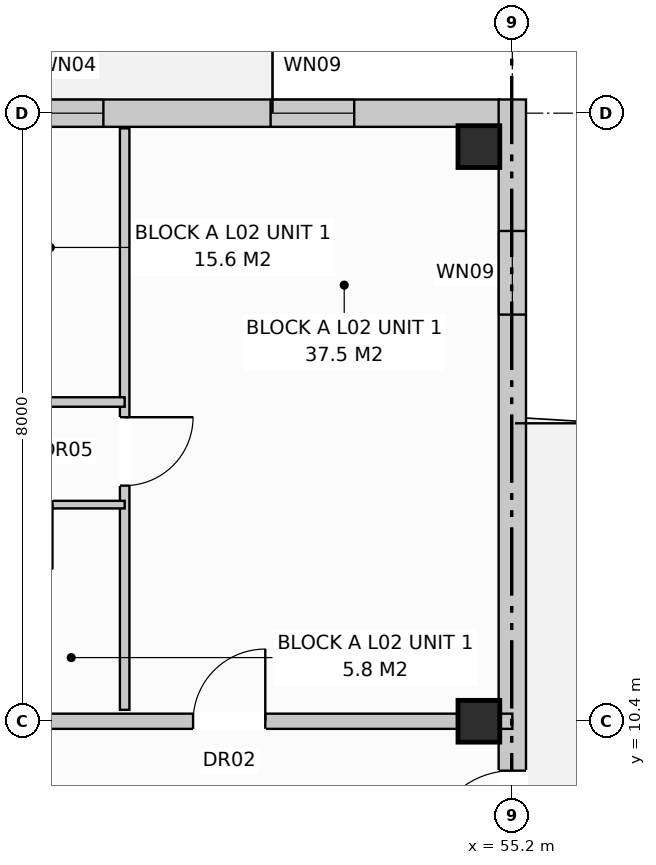
"""IFC4 building model, lengths in metres.
Left out: names, types, materials, properties, quantities, classifications, styles, units other than length and angle.
Written with IfcOpenShell. Run it as: python <this file> out.ifc"""

import sys

from ifc_helpers import new_model, si_unit, direction, frame, frame_2d, origin, origin_with_axes, origin_2d, place, context, subcontext, project, spatial, rectangle, extrude, element, fill, save


model = new_model("IFC4")
c1 = context("Model", 3, precision=1e-05, world=origin(), true_north=direction((0.0, 1.0)))
c2 = subcontext(c1, "Body", "Model", "MODEL_VIEW")
j1 = project(units=[si_unit("LENGTHUNIT", "METRE"), si_unit("PLANEANGLEUNIT", "RADIAN")], contexts=[c1])
p1 = place(None, origin())
s1 = spatial("IfcSite", under=j1, at=p1, CompositionType="ELEMENT")
p2 = place(p1, origin())
s2 = spatial("IfcBuilding", under=s1, at=p2, CompositionType="ELEMENT")
p3 = place(p2, frame((0.0, 0.0, 8.0)))
s3 = spatial("IfcBuildingStorey", under=s2, at=p3, CompositionType="ELEMENT", Elevation=8.0)
for number, where, z_axis, x_axis in (
    (1, (54.76, 10.4, 0.0), (0.0, 0.0, 1.0), (1.0, 0.0, 0.0)),
    (2, (54.76, 17.96, 0.0), (0.0, 0.0, 1.0), (1.0, 0.0, 0.0)),
):
    element("IfcColumn", number, at=place(p3, frame(where, z_axis=z_axis, x_axis=x_axis)), inside=s3, PredefinedType="COLUMN", context=c2, shape_type="SweptSolid", body=[
        extrude(rectangle(XDim=0.55, YDim=0.55, at=origin_2d()), origin(), (0.0, 0.0, 1.0), 3.2),
    ])
p4 = place(p3, frame((31.35, 18.4, 0.0), z_axis=(0.0, 0.0, 1.0), x_axis=(1.0, 0.0, 0.0)))
e3 = element("IfcWall", 3, at=p4, inside=s3, PredefinedType="STANDARD", context=c2, shape_type="SweptSolid", body=[
    extrude(rectangle(XDim=23.68, YDim=0.36, at=frame_2d((11.84, 0.0))), origin(), (0.0, 0.0, 1.0), 2.94),
])
p5 = place(p4, frame((15.27, 0.0, 0.0)))
e4 = element("IfcOpeningElement", 4, at=p5, cuts=e3, PredefinedType="OPENING", context=c2, shape_type="SweptSolid", body=[
    extrude(rectangle(XDim=1.05, YDim=2.12, at=frame_2d((0.525, 1.06))), frame((0.0, 0.192, 0.0), z_axis=(0.0, -1.0, 0.0), x_axis=(1.0, 0.0, 0.0)), (0.0, 0.0, 1.0), 0.384),
])
p6 = place(p4, frame((11.67, 0.0, 0.72)))
e5 = element("IfcOpeningElement", 5, at=p6, cuts=e3, PredefinedType="OPENING", context=c2, shape_type="SweptSolid", body=[
    extrude(rectangle(XDim=1.1, YDim=1.5, at=frame_2d((0.55, 0.75))), frame((0.0, 0.192, 0.0), z_axis=(0.0, -1.0, 0.0), x_axis=(1.0, 0.0, 0.0)), (0.0, 0.0, 1.0), 0.384),
])
p7 = place(p4, frame((17.52, 0.0, 0.9)))
e6 = element("IfcOpeningElement", 6, at=p7, cuts=e3, PredefinedType="OPENING", context=c2, shape_type="SweptSolid", body=[
    extrude(rectangle(XDim=0.95, YDim=1.55, at=frame_2d((0.475, 0.775))), frame((0.0, 0.192, 0.0), z_axis=(0.0, -1.0, 0.0), x_axis=(1.0, 0.0, 0.0)), (0.0, 0.0, 1.0), 0.384),
])
p8 = place(p4, frame((20.67, 0.0, 0.72)))
e7 = element("IfcOpeningElement", 7, at=p8, cuts=e3, PredefinedType="OPENING", context=c2, shape_type="SweptSolid", body=[
    extrude(rectangle(XDim=1.1, YDim=1.5, at=frame_2d((0.55, 0.75))), frame((0.0, 0.192, 0.0), z_axis=(0.0, -1.0, 0.0), x_axis=(1.0, 0.0, 0.0)), (0.0, 0.0, 1.0), 0.384),
])
p9 = place(p3, frame((55.2, -0.18, 0.0), z_axis=(0.0, 0.0, 1.0), x_axis=(0.0, 1.0, 0.0)))
e8 = element("IfcWall", 8, at=p9, inside=s3, PredefinedType="STANDARD", context=c2, shape_type="SweptSolid", body=[
    extrude(rectangle(XDim=18.76, YDim=0.36, at=frame_2d((9.38, 0.0))), origin(), (0.0, 0.0, 1.0), 2.94),
])
p10 = place(p9, frame((8.83, 0.0, 0.0)))
e9 = element("IfcOpeningElement", 9, at=p10, cuts=e8, PredefinedType="OPENING", context=c2, shape_type="SweptSolid", body=[
    extrude(rectangle(XDim=1.1, YDim=2.1, at=frame_2d((0.55, 1.05))), frame((0.0, 0.192, 0.0), z_axis=(0.0, -1.0, 0.0), x_axis=(1.0, 0.0, 0.0)), (0.0, 0.0, 1.0), 0.384),
])
p11 = place(p9, frame((1.73, 0.0, 0.72)))
e10 = element("IfcOpeningElement", 10, at=p11, cuts=e8, PredefinedType="OPENING", context=c2, shape_type="SweptSolid", body=[
    extrude(rectangle(XDim=1.1, YDim=1.5, at=frame_2d((0.55, 0.75))), frame((0.0, 0.192, 0.0), z_axis=(0.0, -1.0, 0.0), x_axis=(1.0, 0.0, 0.0)), (0.0, 0.0, 1.0), 0.384),
])
p12 = place(p9, frame((15.93, 0.0, 0.72)))
e11 = element("IfcOpeningElement", 11, at=p12, cuts=e8, PredefinedType="OPENING", context=c2, shape_type="SweptSolid", body=[
    extrude(rectangle(XDim=1.1, YDim=1.5, at=frame_2d((0.55, 0.75))), frame((0.0, 0.192, 0.0), z_axis=(0.0, -1.0, 0.0), x_axis=(1.0, 0.0, 0.0)), (0.0, 0.0, 1.0), 0.384),
])
p13 = place(p3, frame((41.4, 10.4, 0.0), z_axis=(0.0, 0.0, 1.0), x_axis=(1.0, 0.0, 0.0)))
e12 = element("IfcWall", 12, at=p13, inside=s3, PredefinedType="PARTITIONING", context=c2, shape_type="SweptSolid", body=[
    extrude(rectangle(XDim=13.8, YDim=0.2, at=frame_2d((6.9, 0.0))), origin(), (0.0, 0.0, 1.0), 2.38),
])
p14 = place(p13, frame((9.6, 0.0, 0.0)))
e13 = element("IfcOpeningElement", 13, at=p14, cuts=e12, PredefinedType="OPENING", context=c2, shape_type="SweptSolid", body=[
    extrude(rectangle(XDim=0.95, YDim=2.15, at=frame_2d((0.475, 1.075))), frame((0.0, 0.112, 0.0), z_axis=(0.0, -1.0, 0.0), x_axis=(1.0, 0.0, 0.0)), (0.0, 0.0, 1.0), 0.224),
])
p15 = place(p3, frame((50.1, 10.55, 0.0), z_axis=(0.0, 0.0, 1.0), x_axis=(0.0, 1.0, 0.0)))
e14 = element("IfcWall", 14, at=p15, inside=s3, PredefinedType="PARTITIONING", context=c2, shape_type="SweptSolid", body=[
    extrude(rectangle(XDim=7.65, YDim=0.125, at=frame_2d((3.825, 0.0))), origin(), (0.0, 0.0, 1.0), 2.94),
])
p16 = place(p15, frame((2.95, 0.0, 0.0)))
e15 = element("IfcOpeningElement", 15, at=p16, cuts=e14, PredefinedType="OPENING", context=c2, shape_type="SweptSolid", body=[
    extrude(rectangle(XDim=0.9, YDim=2.1, at=frame_2d((0.45, 1.05))), frame((0.0, 0.074, 0.0), z_axis=(0.0, -1.0, 0.0), x_axis=(1.0, 0.0, 0.0)), (0.0, 0.0, 1.0), 0.149),
])
p17 = place(p3, frame((41.5, 13.25, 0.0), z_axis=(0.0, 0.0, 1.0), x_axis=(1.0, 0.0, 0.0)))
e16 = element("IfcWall", 16, at=p17, inside=s3, PredefinedType="PARTITIONING", context=c2, shape_type="SweptSolid", body=[
    extrude(rectangle(XDim=8.6, YDim=0.1, at=frame_2d((4.3, 0.0))), origin(), (0.0, 0.0, 1.0), 2.94),
])
p18 = place(p17, frame((1.4, 0.0, 0.0)))
e17 = element("IfcOpeningElement", 17, at=p18, cuts=e16, PredefinedType="OPENING", context=c2, shape_type="SweptSolid", body=[
    extrude(rectangle(XDim=0.85, YDim=2.05, at=frame_2d((0.425, 1.025))), frame((0.0, 0.062, 0.0), z_axis=(0.0, -1.0, 0.0), x_axis=(1.0, 0.0, 0.0)), (0.0, 0.0, 1.0), 0.124),
])
p19 = place(p17, frame((4.65, 0.0, 0.0)))
e18 = element("IfcOpeningElement", 18, at=p19, cuts=e16, PredefinedType="OPENING", context=c2, shape_type="SweptSolid", body=[
    extrude(rectangle(XDim=0.85, YDim=2.05, at=frame_2d((0.425, 1.025))), frame((0.0, 0.062, 0.0), z_axis=(0.0, -1.0, 0.0), x_axis=(1.0, 0.0, 0.0)), (0.0, 0.0, 1.0), 0.124),
])
p20 = place(p17, frame((6.8, 0.0, 0.0)))
e19 = element("IfcOpeningElement", 19, at=p20, cuts=e16, PredefinedType="OPENING", context=c2, shape_type="SweptSolid", body=[
    extrude(rectangle(XDim=0.85, YDim=2.1, at=frame_2d((0.425, 1.05))), frame((0.0, 0.062, 0.0), z_axis=(0.0, -1.0, 0.0), x_axis=(1.0, 0.0, 0.0)), (0.0, 0.0, 1.0), 0.124),
])
p21 = place(p3, frame((45.6, 14.6, 0.0), z_axis=(0.0, 0.0, 1.0), x_axis=(1.0, 0.0, 0.0)))
e20 = element("IfcWall", 20, at=p21, inside=s3, PredefinedType="PARTITIONING", context=c2, shape_type="SweptSolid", body=[
    extrude(rectangle(XDim=4.5, YDim=0.125, at=frame_2d((2.25, 0.0))), origin(), (0.0, 0.0, 1.0), 2.94),
])
p22 = place(p21, frame((1.6, 0.0, 0.0)))
e21 = element("IfcOpeningElement", 21, at=p22, cuts=e20, PredefinedType="OPENING", context=c2, shape_type="SweptSolid", body=[
    extrude(rectangle(XDim=0.9, YDim=2.1, at=frame_2d((0.45, 1.05))), frame((0.0, 0.074, 0.0), z_axis=(0.0, -1.0, 0.0), x_axis=(1.0, 0.0, 0.0)), (0.0, 0.0, 1.0), 0.149),
])
p23 = place(p7, origin_with_axes())
e22 = element("IfcWindow", 22, at=p23, inside=s3, PartitioningType="SINGLE_PANEL", PredefinedType="WINDOW", context=c2, shape_type="SweptSolid", body=[
    extrude(rectangle(XDim=0.95, YDim=1.55, at=frame_2d((0.475, 0.775))), frame((0.0, 0.03, 0.0), z_axis=(0.0, -1.0, 0.0), x_axis=(1.0, 0.0, 0.0)), (0.0, 0.0, 1.0), 0.06),
])
fill(e6, e22)
p24 = place(p8, origin_with_axes())
e23 = element("IfcWindow", 23, at=p24, inside=s3, PartitioningType="SINGLE_PANEL", PredefinedType="WINDOW", context=c2, shape_type="SweptSolid", body=[
    extrude(rectangle(XDim=1.1, YDim=1.5, at=frame_2d((0.55, 0.75))), frame((0.0, 0.03, 0.0), z_axis=(0.0, -1.0, 0.0), x_axis=(1.0, 0.0, 0.0)), (0.0, 0.0, 1.0), 0.06),
])
fill(e7, e23)
p25 = place(p10, origin_with_axes())
e24 = element("IfcDoor", 24, at=p25, inside=s3, OperationType="SINGLE_SWING_LEFT", PredefinedType="DOOR", context=c2, shape_type="SweptSolid", body=[
    extrude(rectangle(XDim=1.1, YDim=2.1, at=frame_2d((0.55, 1.05))), frame((0.0, 0.025, 0.0), z_axis=(0.0, -1.0, 0.0), x_axis=(1.0, 0.0, 0.0)), (0.0, 0.0, 1.0), 0.05),
])
fill(e9, e24)
p26 = place(p12, origin_with_axes())
e25 = element("IfcWindow", 25, at=p26, inside=s3, PartitioningType="SINGLE_PANEL", PredefinedType="WINDOW", context=c2, shape_type="SweptSolid", body=[
    extrude(rectangle(XDim=1.1, YDim=1.5, at=frame_2d((0.55, 0.75))), frame((0.0, 0.03, 0.0), z_axis=(0.0, -1.0, 0.0), x_axis=(1.0, 0.0, 0.0)), (0.0, 0.0, 1.0), 0.06),
])
fill(e11, e25)
p27 = place(p14, origin_with_axes())
e26 = element("IfcDoor", 26, at=p27, inside=s3, OperationType="SINGLE_SWING_RIGHT", PredefinedType="DOOR", context=c2, shape_type="SweptSolid", body=[
    extrude(rectangle(XDim=0.95, YDim=2.15, at=frame_2d((0.475, 1.075))), frame((0.0, 0.025, 0.0), z_axis=(0.0, -1.0, 0.0), x_axis=(1.0, 0.0, 0.0)), (0.0, 0.0, 1.0), 0.05),
])
fill(e13, e26)
p28 = place(p16, frame((0.9, 0.0, 0.0), z_axis=(0.0, 0.0, 1.0), x_axis=(-1.0, 0.0, 0.0)))
e27 = element("IfcDoor", 27, at=p28, inside=s3, OperationType="SINGLE_SWING_RIGHT", PredefinedType="DOOR", context=c2, shape_type="SweptSolid", body=[
    extrude(rectangle(XDim=0.9, YDim=2.1, at=frame_2d((0.45, 1.05))), frame((0.0, 0.025, 0.0), z_axis=(0.0, -1.0, 0.0), x_axis=(1.0, 0.0, 0.0)), (0.0, 0.0, 1.0), 0.05),
])
fill(e15, e27)
p29 = place(p20, frame((0.85, 0.0, 0.0), z_axis=(0.0, 0.0, 1.0), x_axis=(-1.0, 0.0, 0.0)))
e28 = element("IfcDoor", 28, at=p29, inside=s3, OperationType="SINGLE_SWING_RIGHT", PredefinedType="DOOR", context=c2, shape_type="SweptSolid", body=[
    extrude(rectangle(XDim=0.85, YDim=2.1, at=frame_2d((0.425, 1.05))), frame((0.0, 0.025, 0.0), z_axis=(0.0, -1.0, 0.0), x_axis=(1.0, 0.0, 0.0)), (0.0, 0.0, 1.0), 0.05),
])
fill(e19, e28)
save(model, sys.argv[1])
